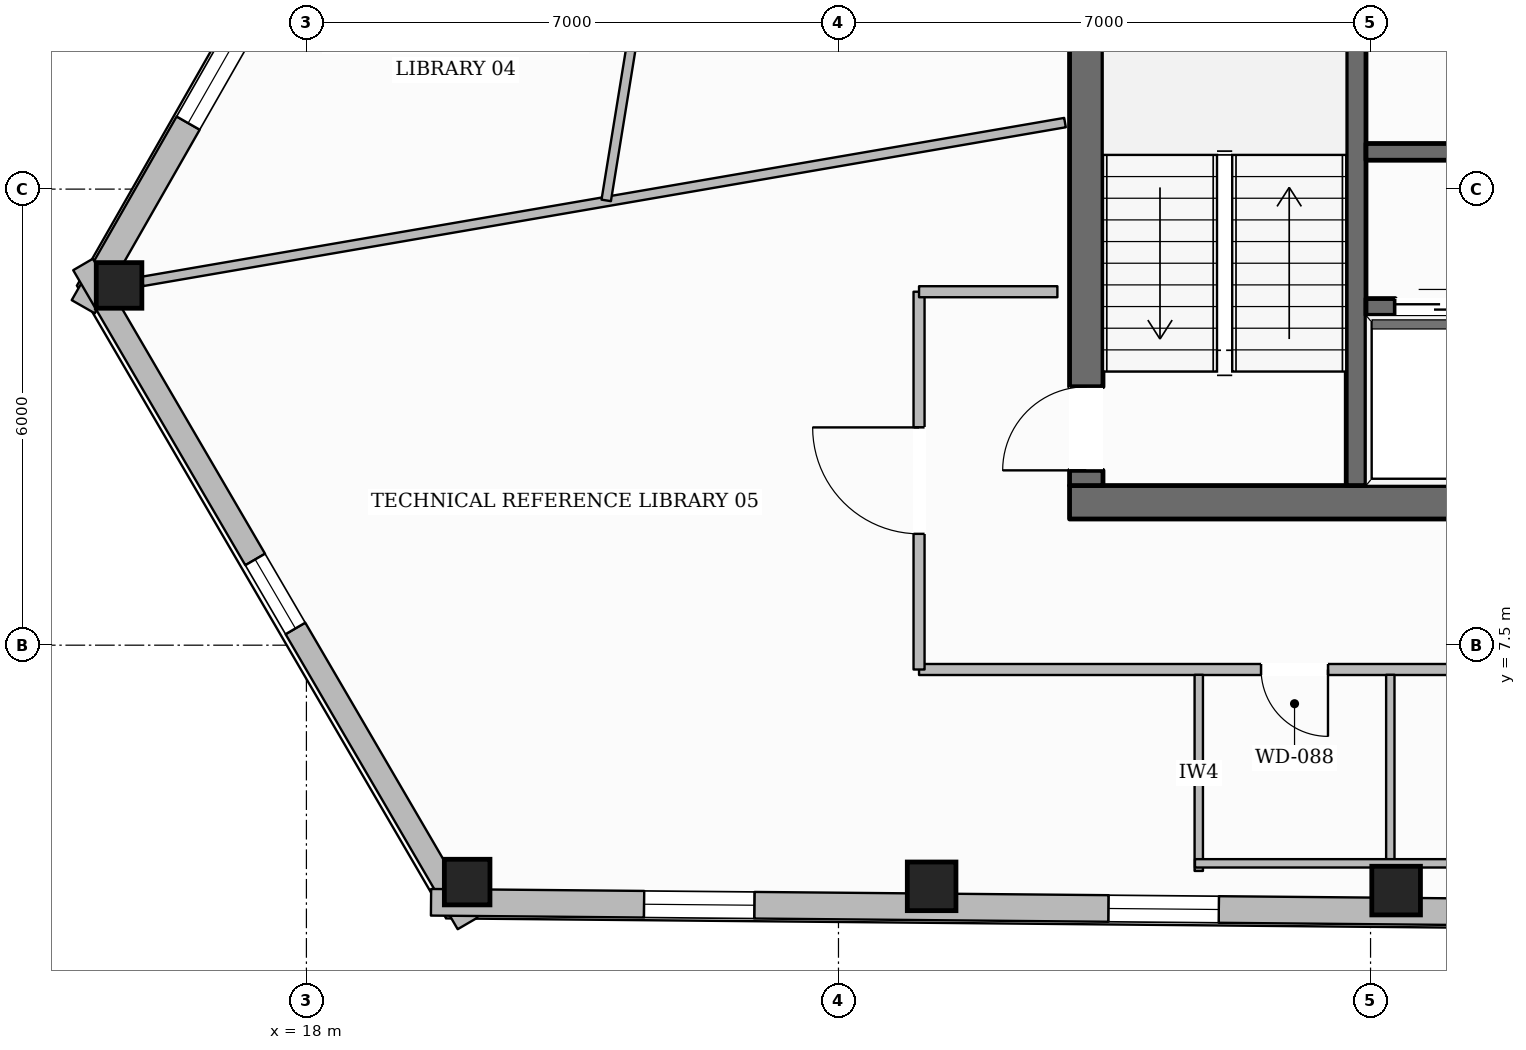
"""IFC4 building model, lengths in metres.
Left out: names, types, materials, properties, quantities, classifications, styles, units other than length and angle.
Written with IfcOpenShell. Run it as: python <this file> out.ifc"""

import sys

from ifc_helpers import new_model, si_unit, direction, frame, frame_2d, origin, origin_2d, place, context, subcontext, project, spatial, rectangle, hollow_rectangle, extrude, element, fill, save


model = new_model("IFC4")
c1 = context("Model", 3, precision=1e-05, world=origin(), true_north=direction((0.0, 1.0)))
c2 = subcontext(c1, "Body", "Model", "MODEL_VIEW")
j1 = project(units=[si_unit("LENGTHUNIT", "METRE"), si_unit("PLANEANGLEUNIT", "RADIAN")], contexts=[c1])
p1 = place(None, origin())
s1 = spatial("IfcSite", under=j1, at=p1, CompositionType="ELEMENT")
p2 = place(p1, origin())
s2 = spatial("IfcBuilding", under=s1, at=p2, CompositionType="ELEMENT")
p3 = place(p2, frame((0.0, 0.0, 184.25)))
s3 = spatial("IfcBuildingStorey", under=s2, at=p3, CompositionType="ELEMENT", Elevation=184.25)
p4 = place(p3, frame((28.04, 9.38, 0.0), z_axis=(0.0, 0.0, 1.0), x_axis=(1.0, 0.0, 0.0)))
e1 = element("IfcWall", 1, at=p4, inside=s3, PredefinedType="SOLIDWALL", context=c2, shape_type="SweptSolid", body=[
    extrude(rectangle(XDim=19.92, YDim=0.44, at=frame_2d((9.96, 0.0))), origin(), (0.0, 0.0, 1.0), 3.6),
])
p5 = place(p4, frame((10.46, 0.0, 0.0)))
e2 = element("IfcOpeningElement", 2, at=p5, cuts=e1, PredefinedType="OPENING", context=c2, shape_type="SweptSolid", body=[
    extrude(rectangle(XDim=1.4, YDim=2.2, at=frame_2d((0.7, 1.1))), frame((0.0, 0.23, 0.0), z_axis=(0.0, -1.0, 0.0), x_axis=(1.0, 0.0, 0.0)), (0.0, 0.0, 1.0), 0.46),
])
p6 = place(p3, frame((28.26, 9.6, 0.0), z_axis=(0.0, 0.0, 1.0), x_axis=(0.0, 1.0, 0.0)))
e3 = element("IfcWall", 3, at=p6, inside=s3, PredefinedType="SOLIDWALL", context=c2, shape_type="SweptSolid", body=[
    extrude(rectangle(XDim=13.0, YDim=0.44, at=frame_2d((6.5, 0.0))), origin(), (0.0, 0.0, 1.0), 3.6),
])
p7 = place(p6, frame((0.2, 0.0, 0.0)))
e4 = element("IfcOpeningElement", 4, at=p7, cuts=e3, PredefinedType="OPENING", context=c2, shape_type="SweptSolid", body=[
    extrude(rectangle(XDim=1.1, YDim=2.15, at=frame_2d((0.55, 1.075))), frame((0.0, 0.23, 0.0), z_axis=(0.0, -1.0, 0.0), x_axis=(1.0, 0.0, 0.0)), (0.0, 0.0, 1.0), 0.46),
])
p8 = place(p6, frame((8.4, 0.0, 0.0)))
e5 = element("IfcOpeningElement", 5, at=p8, cuts=e3, PredefinedType="OPENING", context=c2, shape_type="SweptSolid", body=[
    extrude(rectangle(XDim=0.9, YDim=2.1, at=frame_2d((0.45, 1.05))), frame((0.0, 0.23, 0.0), z_axis=(0.0, -1.0, 0.0), x_axis=(1.0, 0.0, 0.0)), (0.0, 0.0, 1.0), 0.46),
])
p9 = place(p3, frame((31.81, 9.6, 0.0), z_axis=(0.0, 0.0, 1.0), x_axis=(0.0, 1.0, 0.0)))
e6 = element("IfcWall", 6, at=p9, inside=s3, PredefinedType="SHEAR", context=c2, shape_type="SweptSolid", body=[
    extrude(rectangle(XDim=13.0, YDim=0.26, at=frame_2d((6.5, 0.0))), origin(), (0.0, 0.0, 1.0), 3.6),
])
p10 = place(p9, frame((10.925, 0.0, 0.0)))
e7 = element("IfcOpeningElement", 7, at=p10, cuts=e6, PredefinedType="OPENING", context=c2, shape_type="SweptSolid", body=[
    extrude(rectangle(XDim=1.25, YDim=2.25, at=frame_2d((0.625, 1.125))), frame((0.0, 0.14, 0.0), z_axis=(0.0, -1.0, 0.0), x_axis=(1.0, 0.0, 0.0)), (0.0, 0.0, 1.0), 0.28),
])
p11 = place(p3, frame((31.94, 13.99, 0.0), z_axis=(0.0, 0.0, 1.0), x_axis=(1.0, 0.0, 0.0)))
e8 = element("IfcWall", 8, at=p11, inside=s3, PredefinedType="SOLIDWALL", context=c2, shape_type="SweptSolid", body=[
    extrude(rectangle(XDim=12.12, YDim=0.22, at=frame_2d((6.06, 0.0))), origin(), (0.0, 0.0, 1.0), 3.6),
])
p12 = place(p11, frame((1.11, 0.0, 0.0)))
e9 = element("IfcOpeningElement", 9, at=p12, cuts=e8, PredefinedType="OPENING", context=c2, shape_type="SweptSolid", body=[
    extrude(rectangle(XDim=0.9, YDim=2.1, at=frame_2d((0.45, 1.05))), frame((0.0, 0.12, 0.0), z_axis=(0.0, -1.0, 0.0), x_axis=(1.0, 0.0, 0.0)), (0.0, 0.0, 1.0), 0.24),
])
p13 = place(p11, frame((5.16, 0.0, 0.0)))
e10 = element("IfcOpeningElement", 10, at=p13, cuts=e8, PredefinedType="OPENING", context=c2, shape_type="SweptSolid", body=[
    extrude(rectangle(XDim=0.9, YDim=2.1, at=frame_2d((0.45, 1.05))), frame((0.0, 0.12, 0.0), z_axis=(0.0, -1.0, 0.0), x_axis=(1.0, 0.0, 0.0)), (0.0, 0.0, 1.0), 0.24),
])
p14 = place(p11, frame((9.61, 0.0, 0.0)))
e11 = element("IfcOpeningElement", 11, at=p14, cuts=e8, PredefinedType="OPENING", context=c2, shape_type="SweptSolid", body=[
    extrude(rectangle(XDim=0.9, YDim=2.1, at=frame_2d((0.45, 1.05))), frame((0.0, 0.12, 0.0), z_axis=(0.0, -1.0, 0.0), x_axis=(1.0, 0.0, 0.0)), (0.0, 0.0, 1.0), 0.24),
])
p15 = place(p3, frame((31.94, 11.95, 0.0), z_axis=(0.0, 0.0, 1.0), x_axis=(1.0, 0.0, 0.0)))
e12 = element("IfcWall", 12, at=p15, inside=s3, PredefinedType="SOLIDWALL", context=c2, shape_type="SweptSolid", body=[
    extrude(rectangle(XDim=6.19, YDim=0.22, at=frame_2d((3.095, 0.0))), origin(), (0.0, 0.0, 1.0), 3.6),
])
p16 = place(p15, frame((0.385, 0.0, 0.0)))
e13 = element("IfcOpeningElement", 13, at=p16, cuts=e12, PredefinedType="OPENING", context=c2, shape_type="SweptSolid", body=[
    extrude(rectangle(XDim=1.1, YDim=2.2, at=frame_2d((0.55, 1.1))), frame((0.0, 0.12, 0.0), z_axis=(0.0, -1.0, 0.0), x_axis=(1.0, 0.0, 0.0)), (0.0, 0.0, 1.0), 0.24),
])
p17 = place(p15, frame((2.435, 0.0, 0.0)))
e14 = element("IfcOpeningElement", 14, at=p17, cuts=e12, PredefinedType="OPENING", context=c2, shape_type="SweptSolid", body=[
    extrude(rectangle(XDim=1.1, YDim=2.2, at=frame_2d((0.55, 1.1))), frame((0.0, 0.12, 0.0), z_axis=(0.0, -1.0, 0.0), x_axis=(1.0, 0.0, 0.0)), (0.0, 0.0, 1.0), 0.24),
])
p18 = place(p15, frame((4.485, 0.0, 0.0)))
e15 = element("IfcOpeningElement", 15, at=p18, cuts=e12, PredefinedType="OPENING", context=c2, shape_type="SweptSolid", body=[
    extrude(rectangle(XDim=1.1, YDim=2.2, at=frame_2d((0.55, 1.1))), frame((0.0, 0.12, 0.0), z_axis=(0.0, -1.0, 0.0), x_axis=(1.0, 0.0, 0.0)), (0.0, 0.0, 1.0), 0.24),
])
for number, where, z_axis, x_axis in (
    (16, (15.535, 12.233, 0.0), (0.0, 0.0, 1.0), (1.0, 0.0, 0.0)),
    (17, (20.115, 4.383, 0.0), (0.0, 0.0, 1.0), (1.0, 0.0, 0.0)),
):
    element("IfcColumn", number, at=place(p3, frame(where, z_axis=z_axis, x_axis=x_axis)), inside=s3, PredefinedType="COLUMN", context=c2, shape_type="SweptSolid", body=[
        extrude(hollow_rectangle(XDim=0.6, YDim=0.6, WallThickness=0.028, at=origin_2d()), origin(), (0.0, 0.0, 1.0), 3.6),
    ])
for number, where, z_axis, x_axis in (
    (18, (26.226, 4.327, 0.0), (0.0, 0.0, 1.0), (1.0, 0.0, 0.0)),
    (19, (32.336, 4.271, 0.0), (0.0, 0.0, 1.0), (1.0, 0.0, 0.0)),
):
    element("IfcColumn", number, at=place(p3, frame(where, z_axis=z_axis, x_axis=x_axis)), inside=s3, PredefinedType="COLUMN", context=c2, shape_type="SweptSolid", body=[
        extrude(hollow_rectangle(XDim=0.64, YDim=0.64, WallThickness=0.028, at=origin_2d()), origin(), (0.0, 0.0, 1.0), 3.6),
    ])
p19 = place(p3, frame((15.064, 11.953, 0.0), z_axis=(0.0, 0.0, 1.0), x_axis=(0.495993114815, 0.86832645362, 0.0)))
e20 = element("IfcWall", 20, at=p19, inside=s3, PredefinedType="STANDARD", context=c2, shape_type="SweptSolid", body=[
    extrude(rectangle(XDim=37.324, YDim=0.35, at=frame_2d((18.662, 0.0))), origin(), (0.0, 0.0, 1.0), 3.132),
])
p20 = place(p19, frame((33.087, 0.0, 0.65)))
e21 = element("IfcOpeningElement", 21, at=p20, cuts=e20, PredefinedType="OPENING", context=c2, shape_type="SweptSolid", body=[
    extrude(rectangle(XDim=1.45, YDim=1.75, at=frame_2d((0.725, 0.875))), frame((0.0, 0.185, 0.0), z_axis=(0.0, -1.0, 0.0), x_axis=(1.0, 0.0, 0.0)), (0.0, 0.0, 1.0), 0.37),
])
p21 = place(p19, frame((27.026, 0.0, 0.65)))
e22 = element("IfcOpeningElement", 22, at=p21, cuts=e20, PredefinedType="OPENING", context=c2, shape_type="SweptSolid", body=[
    extrude(rectangle(XDim=1.45, YDim=1.75, at=frame_2d((0.725, 0.875))), frame((0.0, 0.185, 0.0), z_axis=(0.0, -1.0, 0.0), x_axis=(1.0, 0.0, 0.0)), (0.0, 0.0, 1.0), 0.37),
])
p22 = place(p19, frame((14.904, 0.0, 0.65)))
e23 = element("IfcOpeningElement", 23, at=p22, cuts=e20, PredefinedType="OPENING", context=c2, shape_type="SweptSolid", body=[
    extrude(rectangle(XDim=1.45, YDim=1.75, at=frame_2d((0.725, 0.875))), frame((0.0, 0.185, 0.0), z_axis=(0.0, -1.0, 0.0), x_axis=(1.0, 0.0, 0.0)), (0.0, 0.0, 1.0), 0.37),
])
p23 = place(p19, frame((8.844, 0.0, 0.65)))
e24 = element("IfcOpeningElement", 24, at=p23, cuts=e20, PredefinedType="OPENING", context=c2, shape_type="SweptSolid", body=[
    extrude(rectangle(XDim=1.45, YDim=1.75, at=frame_2d((0.725, 0.875))), frame((0.0, 0.185, 0.0), z_axis=(0.0, -1.0, 0.0), x_axis=(1.0, 0.0, 0.0)), (0.0, 0.0, 1.0), 0.37),
])
p24 = place(p19, frame((2.782, 0.0, 0.65)))
e25 = element("IfcOpeningElement", 25, at=p24, cuts=e20, PredefinedType="OPENING", context=c2, shape_type="SweptSolid", body=[
    extrude(rectangle(XDim=1.45, YDim=1.75, at=frame_2d((0.725, 0.875))), frame((0.0, 0.185, 0.0), z_axis=(0.0, -1.0, 0.0), x_axis=(1.0, 0.0, 0.0)), (0.0, 0.0, 1.0), 0.37),
])
p25 = place(p3, frame((20.12, 3.839, 0.0), z_axis=(0.0, 0.0, 1.0), x_axis=(-0.503937564299, 0.863740083178, 0.0)))
e26 = element("IfcWall", 26, at=p25, inside=s3, PredefinedType="STANDARD", context=c2, shape_type="SweptSolid", body=[
    extrude(rectangle(XDim=10.038, YDim=0.3, at=frame_2d((5.019, 0.0))), origin(), (0.0, 0.0, 1.0), 3.132),
])
p26 = place(p25, frame((4.494, 0.0, 0.65)))
e27 = element("IfcOpeningElement", 27, at=p26, cuts=e26, PredefinedType="OPENING", context=c2, shape_type="SweptSolid", body=[
    extrude(rectangle(XDim=1.05, YDim=1.7, at=frame_2d((0.525, 0.85))), frame((0.0, 0.16, 0.0), z_axis=(0.0, -1.0, 0.0), x_axis=(1.0, 0.0, 0.0)), (0.0, 0.0, 1.0), 0.32),
])
p27 = place(p3, frame((57.259, 3.773, 0.0), z_axis=(0.0, 0.0, 1.0), x_axis=(-0.999958016909, 0.009163210113, 0.0)))
e28 = element("IfcWall", 28, at=p27, inside=s3, PredefinedType="STANDARD", context=c2, shape_type="SweptSolid", body=[
    extrude(rectangle(XDim=37.621, YDim=0.35, at=frame_2d((18.81, 0.0))), origin(), (0.0, 0.0, 1.0), 3.132),
])
p28 = place(p27, frame((33.368, 0.0, 0.65)))
e29 = element("IfcOpeningElement", 29, at=p28, cuts=e28, PredefinedType="OPENING", context=c2, shape_type="SweptSolid", body=[
    extrude(rectangle(XDim=1.45, YDim=1.75, at=frame_2d((0.725, 0.875))), frame((0.0, 0.185, 0.0), z_axis=(0.0, -1.0, 0.0), x_axis=(1.0, 0.0, 0.0)), (0.0, 0.0, 1.0), 0.37),
])
p29 = place(p27, frame((27.257, 0.0, 0.65)))
e30 = element("IfcOpeningElement", 30, at=p29, cuts=e28, PredefinedType="OPENING", context=c2, shape_type="SweptSolid", body=[
    extrude(rectangle(XDim=1.45, YDim=1.75, at=frame_2d((0.725, 0.875))), frame((0.0, 0.185, 0.0), z_axis=(0.0, -1.0, 0.0), x_axis=(1.0, 0.0, 0.0)), (0.0, 0.0, 1.0), 0.37),
])
p30 = place(p27, frame((15.034, 0.0, 0.65)))
e31 = element("IfcOpeningElement", 31, at=p30, cuts=e28, PredefinedType="OPENING", context=c2, shape_type="SweptSolid", body=[
    extrude(rectangle(XDim=1.45, YDim=1.75, at=frame_2d((0.725, 0.875))), frame((0.0, 0.185, 0.0), z_axis=(0.0, -1.0, 0.0), x_axis=(1.0, 0.0, 0.0)), (0.0, 0.0, 1.0), 0.37),
])
p31 = place(p27, frame((8.923, 0.0, 0.65)))
e32 = element("IfcOpeningElement", 32, at=p31, cuts=e28, PredefinedType="OPENING", context=c2, shape_type="SweptSolid", body=[
    extrude(rectangle(XDim=1.45, YDim=1.75, at=frame_2d((0.725, 0.875))), frame((0.0, 0.185, 0.0), z_axis=(0.0, -1.0, 0.0), x_axis=(1.0, 0.0, 0.0)), (0.0, 0.0, 1.0), 0.37),
])
p32 = place(p27, frame((2.812, 0.0, 0.65)))
e33 = element("IfcOpeningElement", 33, at=p32, cuts=e28, PredefinedType="OPENING", context=c2, shape_type="SweptSolid", body=[
    extrude(rectangle(XDim=1.45, YDim=1.75, at=frame_2d((0.725, 0.875))), frame((0.0, 0.185, 0.0), z_axis=(0.0, -1.0, 0.0), x_axis=(1.0, 0.0, 0.0)), (0.0, 0.0, 1.0), 0.37),
])
p33 = place(p3, frame((49.94, 7.18, 0.0), z_axis=(0.0, 0.0, 1.0), x_axis=(-1.0, 0.0, 0.0)))
e34 = element("IfcWall", 34, at=p33, inside=s3, PredefinedType="PARTITIONING", context=c2, shape_type="SweptSolid", body=[
    extrude(rectangle(XDim=23.88, YDim=0.145, at=frame_2d((11.94, 0.0))), origin(), (0.0, 0.0, 1.0), 3.6),
])
p34 = place(p33, frame((18.5, 0.0, 0.0)))
e35 = element("IfcOpeningElement", 35, at=p34, cuts=e34, PredefinedType="OPENING", context=c2, shape_type="SweptSolid", body=[
    extrude(rectangle(XDim=0.88, YDim=2.1, at=frame_2d((0.44, 1.05))), frame((0.0, 0.083, 0.0), z_axis=(0.0, -1.0, 0.0), x_axis=(1.0, 0.0, 0.0)), (0.0, 0.0, 1.0), 0.165),
])
p35 = place(p33, frame((15.98, 0.0, 0.0)))
e36 = element("IfcOpeningElement", 36, at=p35, cuts=e34, PredefinedType="OPENING", context=c2, shape_type="SweptSolid", body=[
    extrude(rectangle(XDim=0.88, YDim=2.1, at=frame_2d((0.44, 1.05))), frame((0.0, 0.083, 0.0), z_axis=(0.0, -1.0, 0.0), x_axis=(1.0, 0.0, 0.0)), (0.0, 0.0, 1.0), 0.165),
])
p36 = place(p33, frame((13.52, 0.0, 0.0)))
e37 = element("IfcOpeningElement", 37, at=p36, cuts=e34, PredefinedType="OPENING", context=c2, shape_type="SweptSolid", body=[
    extrude(rectangle(XDim=0.96, YDim=2.1, at=frame_2d((0.48, 1.05))), frame((0.0, 0.083, 0.0), z_axis=(0.0, -1.0, 0.0), x_axis=(1.0, 0.0, 0.0)), (0.0, 0.0, 1.0), 0.165),
])
p37 = place(p33, frame((9.446, 0.0, 0.0)))
e38 = element("IfcOpeningElement", 38, at=p37, cuts=e34, PredefinedType="OPENING", context=c2, shape_type="SweptSolid", body=[
    extrude(rectangle(XDim=0.98, YDim=2.15, at=frame_2d((0.49, 1.075))), frame((0.0, 0.083, 0.0), z_axis=(0.0, -1.0, 0.0), x_axis=(1.0, 0.0, 0.0)), (0.0, 0.0, 1.0), 0.165),
])
p38 = place(p3, frame((26.06, 7.18, 0.0), z_axis=(0.0, 0.0, 1.0), x_axis=(0.0, 1.0, 0.0)))
e39 = element("IfcWall", 39, at=p38, inside=s3, PredefinedType="PARTITIONING", context=c2, shape_type="SweptSolid", body=[
    extrude(rectangle(XDim=4.97, YDim=0.145, at=frame_2d((2.485, 0.0))), origin(), (0.0, 0.0, 1.0), 3.6),
])
p39 = place(p38, frame((1.785, 0.0, 0.0)))
e40 = element("IfcOpeningElement", 40, at=p39, cuts=e39, PredefinedType="OPENING", context=c2, shape_type="SweptSolid", body=[
    extrude(rectangle(XDim=1.4, YDim=2.2, at=frame_2d((0.7, 1.1))), frame((0.0, 0.083, 0.0), z_axis=(0.0, -1.0, 0.0), x_axis=(1.0, 0.0, 0.0)), (0.0, 0.0, 1.0), 0.165),
])
p40 = place(p3, frame((26.06, 12.15, 0.0), z_axis=(0.0, 0.0, 1.0), x_axis=(1.0, 0.0, 0.0)))
e41 = element("IfcWall", 41, at=p40, inside=s3, PredefinedType="PARTITIONING", context=c2, shape_type="SweptSolid", body=[
    extrude(rectangle(XDim=1.82, YDim=0.145, at=frame_2d((0.91, 0.0))), origin(), (0.0, 0.0, 1.0), 3.141),
])
p41 = place(p3, frame((29.74, 4.53, 0.0), z_axis=(0.0, 0.0, 1.0), x_axis=(0.0, 1.0, 0.0)))
e42 = element("IfcWall", 42, at=p41, inside=s3, PredefinedType="PLUMBINGWALL", context=c2, shape_type="SweptSolid", body=[
    extrude(rectangle(XDim=2.58, YDim=0.11, at=frame_2d((1.29, 0.0))), origin(), (0.0, 0.0, 1.0), 3.6),
])
p42 = place(p3, frame((32.26, 4.53, 0.0), z_axis=(0.0, 0.0, 1.0), x_axis=(0.0, 1.0, 0.0)))
e43 = element("IfcWall", 43, at=p42, inside=s3, PredefinedType="PLUMBINGWALL", context=c2, shape_type="SweptSolid", body=[
    extrude(rectangle(XDim=2.58, YDim=0.11, at=frame_2d((1.29, 0.0))), origin(), (0.0, 0.0, 1.0), 3.141),
])
p43 = place(p3, frame((29.69, 4.63, 0.0), z_axis=(0.0, 0.0, 1.0), x_axis=(1.0, 0.0, 0.0)))
e44 = element("IfcWall", 44, at=p43, inside=s3, PredefinedType="PLUMBINGWALL", context=c2, shape_type="SweptSolid", body=[
    extrude(rectangle(XDim=7.46, YDim=0.11, at=frame_2d((3.73, 0.0))), origin(), (0.0, 0.0, 1.0), 3.6),
])
p44 = place(p3, frame((27.98, 14.375, 0.0), z_axis=(0.0, 0.0, 1.0), x_axis=(-0.9855033492, -0.169655971646, 0.0)))
e45 = element("IfcWall", 45, at=p44, inside=s3, PredefinedType="PARTITIONING", context=c2, shape_type="SweptSolid", body=[
    extrude(rectangle(XDim=12.315, YDim=0.125, at=frame_2d((6.158, 0.0))), origin(), (0.0, 0.0, 1.0), 3.141),
])
p45 = place(p3, frame((24.273, 27.694, 0.0), z_axis=(0.0, 0.0, 1.0), x_axis=(-0.160245052552, -0.987077263, 0.0)))
e46 = element("IfcWall", 46, at=p45, inside=s3, PredefinedType="PARTITIONING", context=c2, shape_type="SweptSolid", body=[
    extrude(rectangle(XDim=14.53, YDim=0.125, at=frame_2d((7.265, 0.0))), origin(), (0.0, 0.0, 1.0), 3.135),
])
p46 = place(p45, frame((6.665, 0.0, 0.0)))
e47 = element("IfcOpeningElement", 47, at=p46, cuts=e46, PredefinedType="OPENING", context=c2, shape_type="SweptSolid", body=[
    extrude(rectangle(XDim=0.98, YDim=2.15, at=frame_2d((0.49, 1.075))), frame((0.0, 0.073, 0.0), z_axis=(0.0, -1.0, 0.0), x_axis=(1.0, 0.0, 0.0)), (0.0, 0.0, 1.0), 0.145),
])
p47 = place(p24, origin())
e48 = element("IfcWindow", 48, at=p47, inside=s3, PartitioningType="SINGLE_PANEL", PredefinedType="WINDOW", context=c2, shape_type="SweptSolid", body=[
    extrude(rectangle(XDim=1.45, YDim=1.75, at=frame_2d((0.725, 0.875))), frame((0.0, 0.03, 0.0), z_axis=(0.0, -1.0, 0.0), x_axis=(1.0, 0.0, 0.0)), (0.0, 0.0, 1.0), 0.06),
])
fill(e25, e48)
p48 = place(p28, origin())
e49 = element("IfcWindow", 49, at=p48, inside=s3, PartitioningType="SINGLE_PANEL", PredefinedType="WINDOW", context=c2, shape_type="SweptSolid", body=[
    extrude(rectangle(XDim=1.45, YDim=1.75, at=frame_2d((0.725, 0.875))), frame((0.0, 0.03, 0.0), z_axis=(0.0, -1.0, 0.0), x_axis=(1.0, 0.0, 0.0)), (0.0, 0.0, 1.0), 0.06),
])
fill(e29, e49)
p49 = place(p29, origin())
e50 = element("IfcWindow", 50, at=p49, inside=s3, PartitioningType="SINGLE_PANEL", PredefinedType="WINDOW", context=c2, shape_type="SweptSolid", body=[
    extrude(rectangle(XDim=1.45, YDim=1.75, at=frame_2d((0.725, 0.875))), frame((0.0, 0.03, 0.0), z_axis=(0.0, -1.0, 0.0), x_axis=(1.0, 0.0, 0.0)), (0.0, 0.0, 1.0), 0.06),
])
fill(e30, e50)
p50 = place(p26, origin())
e51 = element("IfcWindow", 51, at=p50, inside=s3, PartitioningType="SINGLE_PANEL", PredefinedType="WINDOW", context=c2, shape_type="SweptSolid", body=[
    extrude(rectangle(XDim=1.05, YDim=1.7, at=frame_2d((0.525, 0.85))), frame((0.0, 0.03, 0.0), z_axis=(0.0, -1.0, 0.0), x_axis=(1.0, 0.0, 0.0)), (0.0, 0.0, 1.0), 0.06),
])
fill(e27, e51)
p51 = place(p7, origin())
e52 = element("IfcDoor", 52, at=p51, inside=s3, OperationType="SINGLE_SWING_LEFT", PredefinedType="DOOR", context=c2, shape_type="SweptSolid", body=[
    extrude(rectangle(XDim=1.1, YDim=2.15, at=frame_2d((0.55, 1.075))), frame((0.0, 0.025, 0.0), z_axis=(0.0, -1.0, 0.0), x_axis=(1.0, 0.0, 0.0)), (0.0, 0.0, 1.0), 0.05),
])
fill(e4, e52)
p52 = place(p16, origin())
e53 = element("IfcDoor", 53, at=p52, inside=s3, OperationType="DOUBLE_DOOR_SLIDING", PredefinedType="DOOR", context=c2, shape_type="SweptSolid", body=[
    extrude(rectangle(XDim=1.1, YDim=2.2, at=frame_2d((0.55, 1.1))), frame((0.0, 0.025, 0.0), z_axis=(0.0, -1.0, 0.0), x_axis=(1.0, 0.0, 0.0)), (0.0, 0.0, 1.0), 0.05),
])
fill(e13, e53)
p53 = place(p34, origin())
e54 = element("IfcDoor", 54, at=p53, inside=s3, OperationType="SINGLE_SWING_LEFT", PredefinedType="DOOR", context=c2, shape_type="SweptSolid", body=[
    extrude(rectangle(XDim=0.88, YDim=2.1, at=frame_2d((0.44, 1.05))), frame((0.0, 0.025, 0.0), z_axis=(0.0, -1.0, 0.0), x_axis=(1.0, 0.0, 0.0)), (0.0, 0.0, 1.0), 0.05),
])
fill(e35, e54)
p54 = place(p39, origin())
e55 = element("IfcDoor", 55, at=p54, inside=s3, OperationType="SINGLE_SWING_RIGHT", PredefinedType="DOOR", context=c2, shape_type="SweptSolid", body=[
    extrude(rectangle(XDim=1.4, YDim=2.2, at=frame_2d((0.7, 1.1))), frame((0.0, 0.025, 0.0), z_axis=(0.0, -1.0, 0.0), x_axis=(1.0, 0.0, 0.0)), (0.0, 0.0, 1.0), 0.05),
])
fill(e40, e55)
save(model, sys.argv[1])
